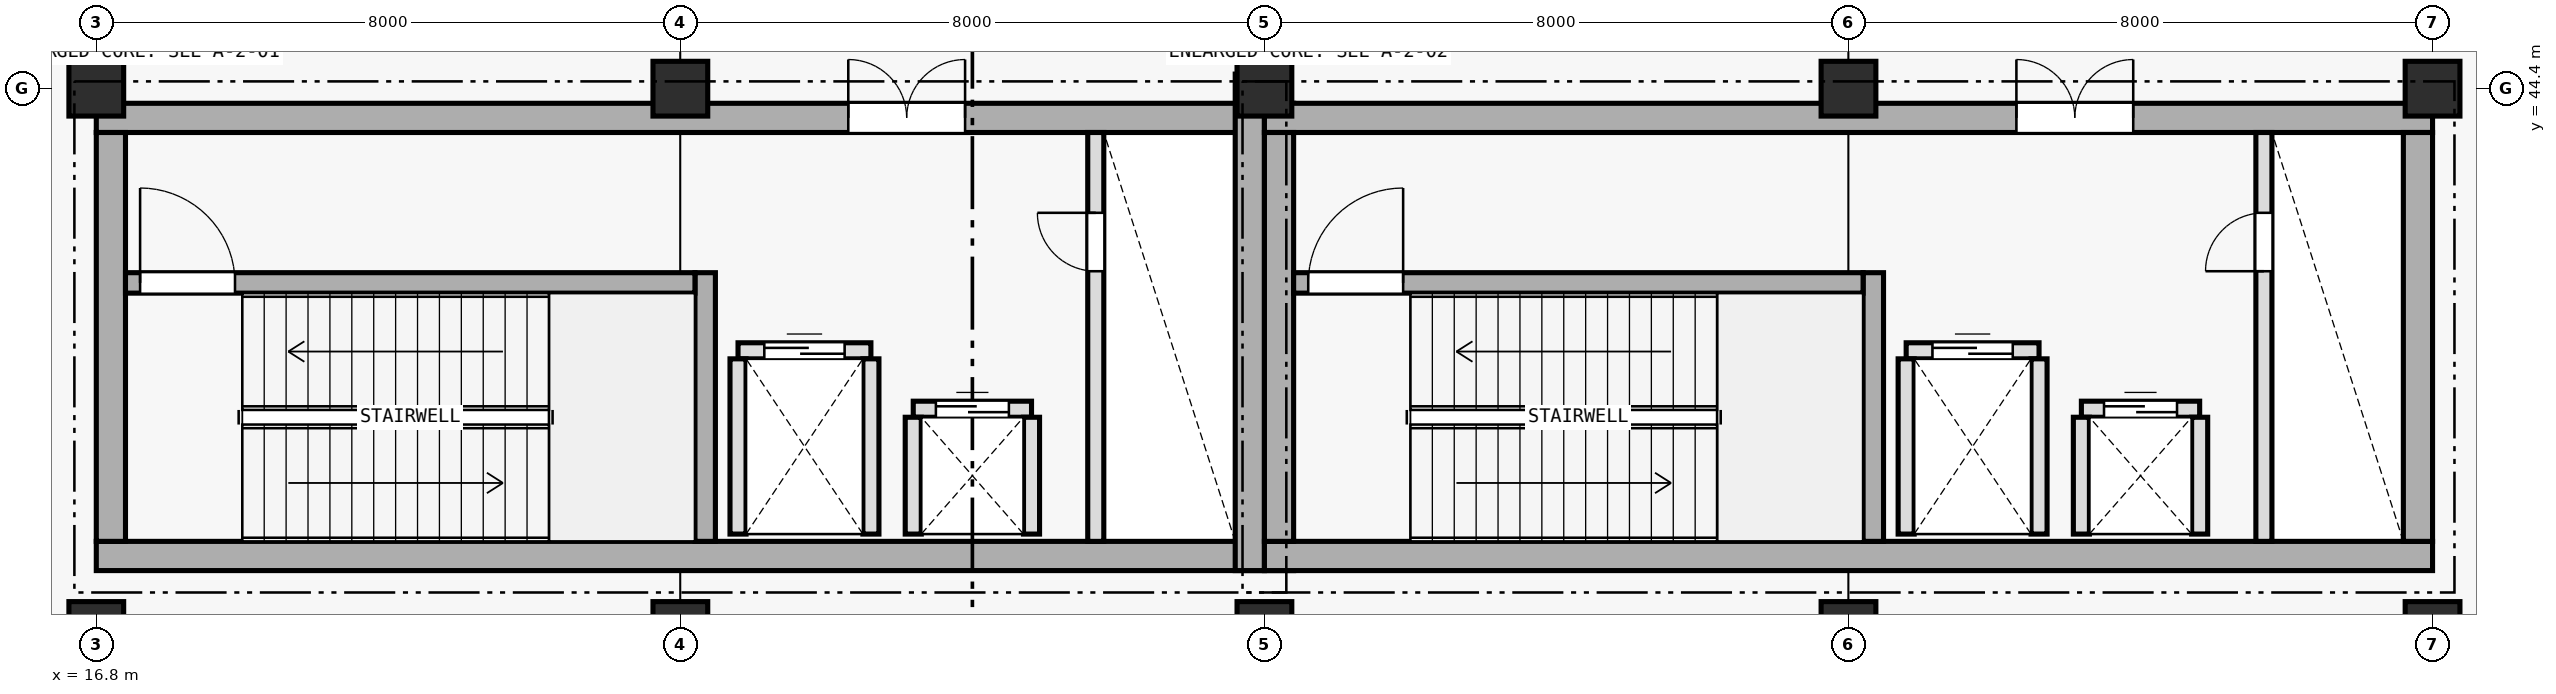
"""IFC4 building model, lengths in metres.
Left out: names, types, materials, properties, quantities, classifications, styles, units other than length and angle.
Written with IfcOpenShell. Run it as: python <this file> out.ifc"""

import sys

from ifc_helpers import new_model, si_unit, direction, frame, frame_2d, origin, origin_2d, place, context, subcontext, project, spatial, rectangle, extrude, element, fill, save


model = new_model("IFC4")
c1 = context("Model", 3, precision=1e-05, world=origin(), true_north=direction((0.0, 1.0)))
c2 = subcontext(c1, "Body", "Model", "MODEL_VIEW")
j1 = project(units=[si_unit("LENGTHUNIT", "METRE"), si_unit("PLANEANGLEUNIT", "RADIAN")], contexts=[c1])
p1 = place(None, origin())
s1 = spatial("IfcSite", under=j1, at=p1, CompositionType="ELEMENT")
p2 = place(p1, origin())
s2 = spatial("IfcBuilding", under=s1, at=p2, CompositionType="ELEMENT")
p3 = place(p2, origin())
s3 = spatial("IfcBuildingStorey", under=s2, at=p3, CompositionType="ELEMENT", Elevation=0.0)
p4 = place(p3, frame((16.8, 38.0, 0.0), z_axis=(0.0, 0.0, 1.0), x_axis=(1.0, 0.0, 0.0)))
e1 = element("IfcWall", 1, at=p4, inside=s3, PredefinedType="SHEAR", context=c2, shape_type="SweptSolid", body=[
    extrude(rectangle(XDim=16.4, YDim=0.4, at=frame_2d((8.2, 0.0))), origin(), (0.0, 0.0, 1.0), 5.395),
])
p5 = place(p3, frame((16.8, 44.0, 0.0), z_axis=(0.0, 0.0, 1.0), x_axis=(1.0, 0.0, 0.0)))
e2 = element("IfcWall", 2, at=p5, inside=s3, PredefinedType="SHEAR", context=c2, shape_type="SweptSolid", body=[
    extrude(rectangle(XDim=16.4, YDim=0.4, at=frame_2d((8.2, 0.0))), origin(), (0.0, 0.0, 1.0), 5.395),
])
p6 = place(p5, frame((10.3, 0.0, 0.0)))
e3 = element("IfcOpeningElement", 3, at=p6, cuts=e2, PredefinedType="OPENING", context=c2, shape_type="SweptSolid", body=[
    extrude(rectangle(XDim=1.6, YDim=2.2, at=frame_2d((0.8, 1.1))), frame((0.0, 0.21, 0.0), z_axis=(0.0, -1.0, 0.0), x_axis=(1.0, 0.0, 0.0)), (0.0, 0.0, 1.0), 0.42),
])
p7 = place(p3, frame((17.0, 38.2, 0.0), z_axis=(0.0, 0.0, 1.0), x_axis=(0.0, 1.0, 0.0)))
e4 = element("IfcWall", 4, at=p7, inside=s3, PredefinedType="SHEAR", context=c2, shape_type="SweptSolid", body=[
    extrude(rectangle(XDim=5.6, YDim=0.4, at=frame_2d((2.8, 0.0))), origin(), (0.0, 0.0, 1.0), 5.395),
])
p8 = place(p3, frame((32.6, 37.8, 0.0), z_axis=(0.0, 0.0, 1.0), x_axis=(0.0, 1.0, 0.0)))
e5 = element("IfcWall", 5, at=p8, inside=s3, PredefinedType="SHEAR", context=c2, shape_type="SweptSolid", body=[
    extrude(rectangle(XDim=6.8, YDim=0.4, at=frame_2d((3.4, 0.0))), origin(), (0.0, 0.0, 1.0), 5.395),
])
p9 = place(p3, frame((25.14, 38.2, 0.0), z_axis=(0.0, 0.0, 1.0), x_axis=(0.0, 1.0, 0.0)))
e6 = element("IfcWall", 6, at=p9, inside=s3, PredefinedType="SHEAR", context=c2, shape_type="SweptSolid", body=[
    extrude(rectangle(XDim=3.68, YDim=0.28, at=frame_2d((1.84, 0.0))), origin(), (0.0, 0.0, 1.0), 5.395),
])
p10 = place(p3, frame((17.2, 41.74, 0.0), z_axis=(0.0, 0.0, 1.0), x_axis=(1.0, 0.0, 0.0)))
e7 = element("IfcWall", 7, at=p10, inside=s3, PredefinedType="SHEAR", context=c2, shape_type="SweptSolid", body=[
    extrude(rectangle(XDim=7.8, YDim=0.28, at=frame_2d((3.9, 0.0))), origin(), (0.0, 0.0, 1.0), 5.395),
])
p11 = place(p10, frame((0.2, 0.0, 0.0)))
e8 = element("IfcOpeningElement", 8, at=p11, cuts=e7, PredefinedType="OPENING", context=c2, shape_type="SweptSolid", body=[
    extrude(rectangle(XDim=1.3, YDim=2.2, at=frame_2d((0.65, 1.1))), frame((0.0, 0.15, 0.0), z_axis=(0.0, -1.0, 0.0), x_axis=(1.0, 0.0, 0.0)), (0.0, 0.0, 1.0), 0.3),
])
p12 = place(p3, frame((32.8, 38.0, 0.0), z_axis=(0.0, 0.0, 1.0), x_axis=(1.0, 0.0, 0.0)))
e9 = element("IfcWall", 9, at=p12, inside=s3, PredefinedType="SHEAR", context=c2, shape_type="SweptSolid", body=[
    extrude(rectangle(XDim=16.0, YDim=0.4, at=frame_2d((8.0, 0.0))), origin(), (0.0, 0.0, 1.0), 5.395),
])
p13 = place(p3, frame((32.8, 44.0, 0.0), z_axis=(0.0, 0.0, 1.0), x_axis=(1.0, 0.0, 0.0)))
e10 = element("IfcWall", 10, at=p13, inside=s3, PredefinedType="SHEAR", context=c2, shape_type="SweptSolid", body=[
    extrude(rectangle(XDim=16.0, YDim=0.4, at=frame_2d((8.0, 0.0))), origin(), (0.0, 0.0, 1.0), 5.395),
])
p14 = place(p13, frame((10.3, 0.0, 0.0)))
e11 = element("IfcOpeningElement", 11, at=p14, cuts=e10, PredefinedType="OPENING", context=c2, shape_type="SweptSolid", body=[
    extrude(rectangle(XDim=1.6, YDim=2.2, at=frame_2d((0.8, 1.1))), frame((0.0, 0.21, 0.0), z_axis=(0.0, -1.0, 0.0), x_axis=(1.0, 0.0, 0.0)), (0.0, 0.0, 1.0), 0.42),
])
for number, where, z_axis, x_axis in (
    (12, (33.0, 38.2, 0.0), (0.0, 0.0, 1.0), (0.0, 1.0, 0.0)),
    (13, (48.6, 38.2, 0.0), (0.0, 0.0, 1.0), (0.0, 1.0, 0.0)),
):
    element("IfcWall", number, at=place(p3, frame(where, z_axis=z_axis, x_axis=x_axis)), inside=s3, PredefinedType="SHEAR", context=c2, shape_type="SweptSolid", body=[
        extrude(rectangle(XDim=5.6, YDim=0.4, at=frame_2d((2.8, 0.0))), origin(), (0.0, 0.0, 1.0), 5.395),
    ])
p15 = place(p3, frame((41.14, 38.2, 0.0), z_axis=(0.0, 0.0, 1.0), x_axis=(0.0, 1.0, 0.0)))
e14 = element("IfcWall", 14, at=p15, inside=s3, PredefinedType="SHEAR", context=c2, shape_type="SweptSolid", body=[
    extrude(rectangle(XDim=3.68, YDim=0.28, at=frame_2d((1.84, 0.0))), origin(), (0.0, 0.0, 1.0), 5.395),
])
p16 = place(p3, frame((33.2, 41.74, 0.0), z_axis=(0.0, 0.0, 1.0), x_axis=(1.0, 0.0, 0.0)))
e15 = element("IfcWall", 15, at=p16, inside=s3, PredefinedType="SHEAR", context=c2, shape_type="SweptSolid", body=[
    extrude(rectangle(XDim=7.8, YDim=0.28, at=frame_2d((3.9, 0.0))), origin(), (0.0, 0.0, 1.0), 5.395),
])
p17 = place(p16, frame((0.2, 0.0, 0.0)))
e16 = element("IfcOpeningElement", 16, at=p17, cuts=e15, PredefinedType="OPENING", context=c2, shape_type="SweptSolid", body=[
    extrude(rectangle(XDim=1.3, YDim=2.2, at=frame_2d((0.65, 1.1))), frame((0.0, 0.15, 0.0), z_axis=(0.0, -1.0, 0.0), x_axis=(1.0, 0.0, 0.0)), (0.0, 0.0, 1.0), 0.3),
])
for number, where, z_axis, x_axis in (
    (17, (16.8, 37.0, 0.0), (0.0, 0.0, 1.0), (1.0, 0.0, 0.0)),
    (18, (16.8, 44.4, 0.0), (0.0, 0.0, 1.0), (1.0, 0.0, 0.0)),
    (19, (24.8, 37.0, 0.0), (0.0, 0.0, 1.0), (1.0, 0.0, 0.0)),
    (20, (24.8, 44.4, 0.0), (0.0, 0.0, 1.0), (1.0, 0.0, 0.0)),
    (21, (32.8, 37.0, 0.0), (0.0, 0.0, 1.0), (1.0, 0.0, 0.0)),
    (22, (32.8, 44.4, 0.0), (0.0, 0.0, 1.0), (1.0, 0.0, 0.0)),
    (23, (40.8, 37.0, 0.0), (0.0, 0.0, 1.0), (1.0, 0.0, 0.0)),
    (24, (40.8, 44.4, 0.0), (0.0, 0.0, 1.0), (1.0, 0.0, 0.0)),
    (25, (48.8, 37.0, 0.0), (0.0, 0.0, 1.0), (1.0, 0.0, 0.0)),
    (26, (48.8, 44.4, 0.0), (0.0, 0.0, 1.0), (1.0, 0.0, 0.0)),
):
    element("IfcColumn", number, at=place(p3, frame(where, z_axis=z_axis, x_axis=x_axis)), inside=s3, PredefinedType="COLUMN", context=c2, shape_type="SweptSolid", body=[
        extrude(rectangle(XDim=0.75, YDim=0.75, at=origin_2d()), origin(), (0.0, 0.0, 1.0), 5.4),
    ])
p18 = place(p3, frame((25.59, 40.81, 0.0), z_axis=(0.0, 0.0, 1.0), x_axis=(1.0, 0.0, 0.0)))
e27 = element("IfcWall", 27, at=p18, inside=s3, PredefinedType="PLUMBINGWALL", context=c2, shape_type="SweptSolid", body=[
    extrude(rectangle(XDim=1.82, YDim=0.22, at=frame_2d((0.91, 0.0))), origin(), (0.0, 0.0, 1.0), 5.14),
])
p19 = place(p18, frame((0.36, 0.0, 0.0)))
e28 = element("IfcOpeningElement", 28, at=p19, cuts=e27, PredefinedType="OPENING", context=c2, shape_type="SweptSolid", body=[
    extrude(rectangle(XDim=1.1, YDim=2.2, at=frame_2d((0.55, 1.1))), frame((0.0, 0.12, 0.0), z_axis=(0.0, -1.0, 0.0), x_axis=(1.0, 0.0, 0.0)), (0.0, 0.0, 1.0), 0.24),
])
for number, where, z_axis, x_axis in (
    (29, (25.59, 38.3, 0.0), (0.0, 0.0, 1.0), (0.0, 1.0, 0.0)),
    (30, (27.41, 38.3, 0.0), (0.0, 0.0, 1.0), (0.0, 1.0, 0.0)),
):
    element("IfcWall", number, at=place(p3, frame(where, z_axis=z_axis, x_axis=x_axis)), inside=s3, PredefinedType="PLUMBINGWALL", context=c2, shape_type="SweptSolid", body=[
        extrude(rectangle(XDim=2.4, YDim=0.22, at=frame_2d((1.2, 0.0))), origin(), (0.0, 0.0, 1.0), 5.14),
    ])
p20 = place(p3, frame((27.99, 40.01, 0.0), z_axis=(0.0, 0.0, 1.0), x_axis=(1.0, 0.0, 0.0)))
e31 = element("IfcWall", 31, at=p20, inside=s3, PredefinedType="PLUMBINGWALL", context=c2, shape_type="SweptSolid", body=[
    extrude(rectangle(XDim=1.62, YDim=0.22, at=frame_2d((0.81, 0.0))), origin(), (0.0, 0.0, 1.0), 5.14),
])
p21 = place(p20, frame((0.31, 0.0, 0.0)))
e32 = element("IfcOpeningElement", 32, at=p21, cuts=e31, PredefinedType="OPENING", context=c2, shape_type="SweptSolid", body=[
    extrude(rectangle(XDim=1.0, YDim=2.2, at=frame_2d((0.5, 1.1))), frame((0.0, 0.12, 0.0), z_axis=(0.0, -1.0, 0.0), x_axis=(1.0, 0.0, 0.0)), (0.0, 0.0, 1.0), 0.24),
])
for number, where, z_axis, x_axis in (
    (33, (27.99, 38.3, 0.0), (0.0, 0.0, 1.0), (0.0, 1.0, 0.0)),
    (34, (29.61, 38.3, 0.0), (0.0, 0.0, 1.0), (0.0, 1.0, 0.0)),
):
    element("IfcWall", number, at=place(p3, frame(where, z_axis=z_axis, x_axis=x_axis)), inside=s3, PredefinedType="PLUMBINGWALL", context=c2, shape_type="SweptSolid", body=[
        extrude(rectangle(XDim=1.6, YDim=0.22, at=frame_2d((0.8, 0.0))), origin(), (0.0, 0.0, 1.0), 5.14),
    ])
p22 = place(p3, frame((30.49, 38.2, 0.0), z_axis=(0.0, 0.0, 1.0), x_axis=(0.0, 1.0, 0.0)))
e35 = element("IfcWall", 35, at=p22, inside=s3, PredefinedType="PLUMBINGWALL", context=c2, shape_type="SweptSolid", body=[
    extrude(rectangle(XDim=5.6, YDim=0.22, at=frame_2d((2.8, 0.0))), origin(), (0.0, 0.0, 1.0), 5.14),
])
p23 = place(p22, frame((3.7, 0.0, 0.0)))
e36 = element("IfcOpeningElement", 36, at=p23, cuts=e35, PredefinedType="OPENING", context=c2, shape_type="SweptSolid", body=[
    extrude(rectangle(XDim=0.8, YDim=2.1, at=frame_2d((0.4, 1.05))), frame((0.0, 0.12, 0.0), z_axis=(0.0, -1.0, 0.0), x_axis=(1.0, 0.0, 0.0)), (0.0, 0.0, 1.0), 0.24),
])
p24 = place(p3, frame((41.59, 40.81, 0.0), z_axis=(0.0, 0.0, 1.0), x_axis=(1.0, 0.0, 0.0)))
e37 = element("IfcWall", 37, at=p24, inside=s3, PredefinedType="PLUMBINGWALL", context=c2, shape_type="SweptSolid", body=[
    extrude(rectangle(XDim=1.82, YDim=0.22, at=frame_2d((0.91, 0.0))), origin(), (0.0, 0.0, 1.0), 5.14),
])
p25 = place(p24, frame((0.36, 0.0, 0.0)))
e38 = element("IfcOpeningElement", 38, at=p25, cuts=e37, PredefinedType="OPENING", context=c2, shape_type="SweptSolid", body=[
    extrude(rectangle(XDim=1.1, YDim=2.2, at=frame_2d((0.55, 1.1))), frame((0.0, 0.12, 0.0), z_axis=(0.0, -1.0, 0.0), x_axis=(1.0, 0.0, 0.0)), (0.0, 0.0, 1.0), 0.24),
])
for number, where, z_axis, x_axis in (
    (39, (41.59, 38.3, 0.0), (0.0, 0.0, 1.0), (0.0, 1.0, 0.0)),
    (40, (43.41, 38.3, 0.0), (0.0, 0.0, 1.0), (0.0, 1.0, 0.0)),
):
    element("IfcWall", number, at=place(p3, frame(where, z_axis=z_axis, x_axis=x_axis)), inside=s3, PredefinedType="PLUMBINGWALL", context=c2, shape_type="SweptSolid", body=[
        extrude(rectangle(XDim=2.4, YDim=0.22, at=frame_2d((1.2, 0.0))), origin(), (0.0, 0.0, 1.0), 5.14),
    ])
p26 = place(p3, frame((43.99, 40.01, 0.0), z_axis=(0.0, 0.0, 1.0), x_axis=(1.0, 0.0, 0.0)))
e41 = element("IfcWall", 41, at=p26, inside=s3, PredefinedType="PLUMBINGWALL", context=c2, shape_type="SweptSolid", body=[
    extrude(rectangle(XDim=1.62, YDim=0.22, at=frame_2d((0.81, 0.0))), origin(), (0.0, 0.0, 1.0), 5.14),
])
p27 = place(p26, frame((0.31, 0.0, 0.0)))
e42 = element("IfcOpeningElement", 42, at=p27, cuts=e41, PredefinedType="OPENING", context=c2, shape_type="SweptSolid", body=[
    extrude(rectangle(XDim=1.0, YDim=2.2, at=frame_2d((0.5, 1.1))), frame((0.0, 0.12, 0.0), z_axis=(0.0, -1.0, 0.0), x_axis=(1.0, 0.0, 0.0)), (0.0, 0.0, 1.0), 0.24),
])
for number, where, z_axis, x_axis in (
    (43, (43.99, 38.3, 0.0), (0.0, 0.0, 1.0), (0.0, 1.0, 0.0)),
    (44, (45.61, 38.3, 0.0), (0.0, 0.0, 1.0), (0.0, 1.0, 0.0)),
):
    element("IfcWall", number, at=place(p3, frame(where, z_axis=z_axis, x_axis=x_axis)), inside=s3, PredefinedType="PLUMBINGWALL", context=c2, shape_type="SweptSolid", body=[
        extrude(rectangle(XDim=1.6, YDim=0.22, at=frame_2d((0.8, 0.0))), origin(), (0.0, 0.0, 1.0), 5.14),
    ])
p28 = place(p3, frame((46.49, 38.2, 0.0), z_axis=(0.0, 0.0, 1.0), x_axis=(0.0, 1.0, 0.0)))
e45 = element("IfcWall", 45, at=p28, inside=s3, PredefinedType="PLUMBINGWALL", context=c2, shape_type="SweptSolid", body=[
    extrude(rectangle(XDim=5.6, YDim=0.22, at=frame_2d((2.8, 0.0))), origin(), (0.0, 0.0, 1.0), 5.14),
])
p29 = place(p28, frame((3.7, 0.0, 0.0)))
e46 = element("IfcOpeningElement", 46, at=p29, cuts=e45, PredefinedType="OPENING", context=c2, shape_type="SweptSolid", body=[
    extrude(rectangle(XDim=0.8, YDim=2.1, at=frame_2d((0.4, 1.05))), frame((0.0, 0.12, 0.0), z_axis=(0.0, -1.0, 0.0), x_axis=(1.0, 0.0, 0.0)), (0.0, 0.0, 1.0), 0.24),
])
p30 = place(p11, origin())
e47 = element("IfcDoor", 47, at=p30, inside=s3, OperationType="SINGLE_SWING_LEFT", PredefinedType="DOOR", context=c2, shape_type="SweptSolid", body=[
    extrude(rectangle(XDim=1.3, YDim=2.2, at=frame_2d((0.65, 1.1))), frame((0.0, 0.025, 0.0), z_axis=(0.0, -1.0, 0.0), x_axis=(1.0, 0.0, 0.0)), (0.0, 0.0, 1.0), 0.05),
])
fill(e8, e47)
p31 = place(p19, origin())
e48 = element("IfcDoor", 48, at=p31, inside=s3, OperationType="DOUBLE_DOOR_SLIDING", PredefinedType="DOOR", context=c2, shape_type="SweptSolid", body=[
    extrude(rectangle(XDim=1.1, YDim=2.2, at=frame_2d((0.55, 1.1))), frame((0.0, 0.025, 0.0), z_axis=(0.0, -1.0, 0.0), x_axis=(1.0, 0.0, 0.0)), (0.0, 0.0, 1.0), 0.05),
])
fill(e28, e48)
p32 = place(p21, origin())
e49 = element("IfcDoor", 49, at=p32, inside=s3, OperationType="DOUBLE_DOOR_SLIDING", PredefinedType="DOOR", context=c2, shape_type="SweptSolid", body=[
    extrude(rectangle(XDim=1.0, YDim=2.2, at=frame_2d((0.5, 1.1))), frame((0.0, 0.025, 0.0), z_axis=(0.0, -1.0, 0.0), x_axis=(1.0, 0.0, 0.0)), (0.0, 0.0, 1.0), 0.05),
])
fill(e32, e49)
p33 = place(p23, origin())
e50 = element("IfcDoor", 50, at=p33, inside=s3, OperationType="SINGLE_SWING_RIGHT", PredefinedType="DOOR", context=c2, shape_type="SweptSolid", body=[
    extrude(rectangle(XDim=0.8, YDim=2.1, at=frame_2d((0.4, 1.05))), frame((0.0, 0.025, 0.0), z_axis=(0.0, -1.0, 0.0), x_axis=(1.0, 0.0, 0.0)), (0.0, 0.0, 1.0), 0.05),
])
fill(e36, e50)
p34 = place(p6, origin())
e51 = element("IfcDoor", 51, at=p34, inside=s3, OperationType="DOUBLE_DOOR_SINGLE_SWING", PredefinedType="DOOR", context=c2, shape_type="SweptSolid", body=[
    extrude(rectangle(XDim=1.6, YDim=2.2, at=frame_2d((0.8, 1.1))), frame((0.0, 0.025, 0.0), z_axis=(0.0, -1.0, 0.0), x_axis=(1.0, 0.0, 0.0)), (0.0, 0.0, 1.0), 0.05),
])
fill(e3, e51)
p35 = place(p17, origin())
e52 = element("IfcDoor", 52, at=p35, inside=s3, OperationType="SINGLE_SWING_RIGHT", PredefinedType="DOOR", context=c2, shape_type="SweptSolid", body=[
    extrude(rectangle(XDim=1.3, YDim=2.2, at=frame_2d((0.65, 1.1))), frame((0.0, 0.025, 0.0), z_axis=(0.0, -1.0, 0.0), x_axis=(1.0, 0.0, 0.0)), (0.0, 0.0, 1.0), 0.05),
])
fill(e16, e52)
p36 = place(p25, origin())
e53 = element("IfcDoor", 53, at=p36, inside=s3, OperationType="DOUBLE_DOOR_SLIDING", PredefinedType="DOOR", context=c2, shape_type="SweptSolid", body=[
    extrude(rectangle(XDim=1.1, YDim=2.2, at=frame_2d((0.55, 1.1))), frame((0.0, 0.025, 0.0), z_axis=(0.0, -1.0, 0.0), x_axis=(1.0, 0.0, 0.0)), (0.0, 0.0, 1.0), 0.05),
])
fill(e38, e53)
p37 = place(p27, origin())
e54 = element("IfcDoor", 54, at=p37, inside=s3, OperationType="DOUBLE_DOOR_SLIDING", PredefinedType="DOOR", context=c2, shape_type="SweptSolid", body=[
    extrude(rectangle(XDim=1.0, YDim=2.2, at=frame_2d((0.5, 1.1))), frame((0.0, 0.025, 0.0), z_axis=(0.0, -1.0, 0.0), x_axis=(1.0, 0.0, 0.0)), (0.0, 0.0, 1.0), 0.05),
])
fill(e42, e54)
p38 = place(p29, origin())
e55 = element("IfcDoor", 55, at=p38, inside=s3, OperationType="SINGLE_SWING_LEFT", PredefinedType="DOOR", context=c2, shape_type="SweptSolid", body=[
    extrude(rectangle(XDim=0.8, YDim=2.1, at=frame_2d((0.4, 1.05))), frame((0.0, 0.025, 0.0), z_axis=(0.0, -1.0, 0.0), x_axis=(1.0, 0.0, 0.0)), (0.0, 0.0, 1.0), 0.05),
])
fill(e46, e55)
p39 = place(p14, origin())
e56 = element("IfcDoor", 56, at=p39, inside=s3, OperationType="DOUBLE_DOOR_SINGLE_SWING", PredefinedType="DOOR", context=c2, shape_type="SweptSolid", body=[
    extrude(rectangle(XDim=1.6, YDim=2.2, at=frame_2d((0.8, 1.1))), frame((0.0, 0.025, 0.0), z_axis=(0.0, -1.0, 0.0), x_axis=(1.0, 0.0, 0.0)), (0.0, 0.0, 1.0), 0.05),
])
fill(e11, e56)
save(model, sys.argv[1])
